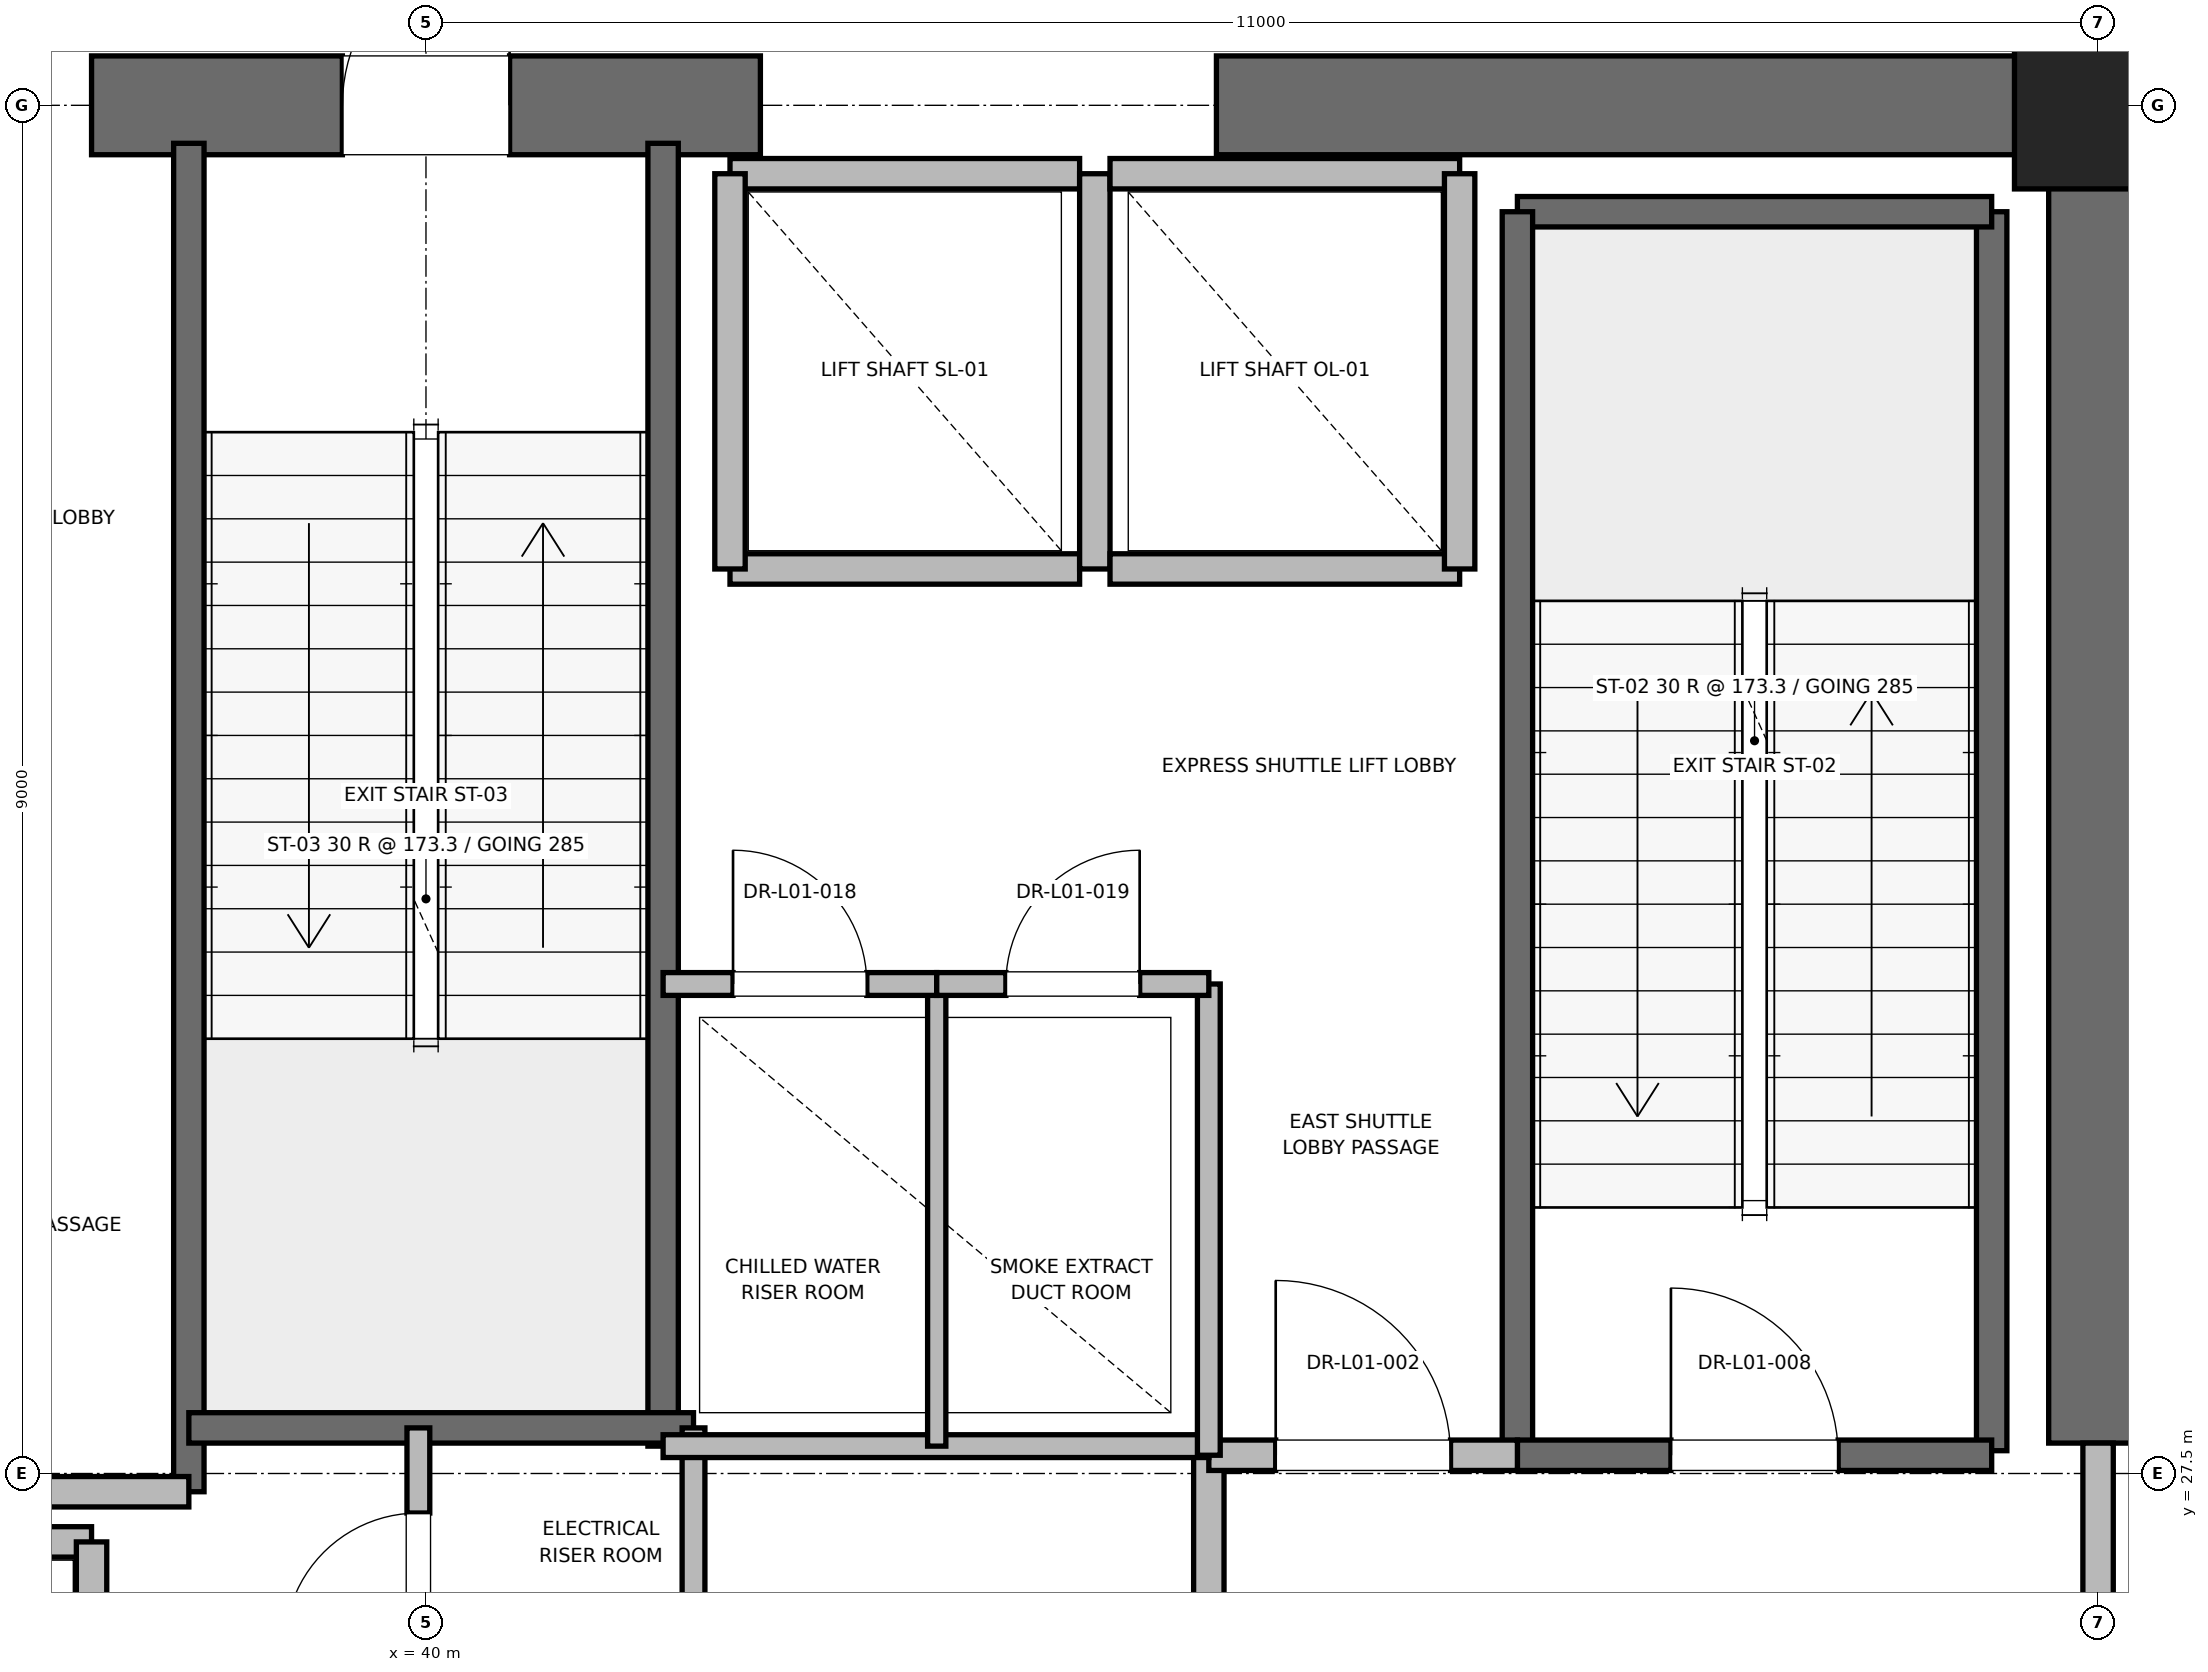
"""IFC4 building model, lengths in metres.
Left out: names, types, materials, properties, quantities, classifications, styles, units other than length and angle.
Written with IfcOpenShell. Run it as: python <this file> out.ifc"""

import sys

from ifc_helpers import new_model, si_unit, direction, frame, frame_2d, origin, origin_2d, place, context, subcontext, project, spatial, rectangle, extrude, element, fill, save


model = new_model("IFC4")
c1 = context("Model", 3, precision=1e-05, world=origin(), true_north=direction((0.0, 1.0)))
c2 = subcontext(c1, "Body", "Model", "MODEL_VIEW")
j1 = project(units=[si_unit("LENGTHUNIT", "METRE"), si_unit("PLANEANGLEUNIT", "RADIAN")], contexts=[c1])
p1 = place(None, origin())
s1 = spatial("IfcSite", under=j1, at=p1, CompositionType="ELEMENT")
p2 = place(p1, origin())
s2 = spatial("IfcBuilding", under=s1, at=p2, CompositionType="ELEMENT")
p3 = place(p2, frame((0.0, 0.0, 6.0)))
s3 = spatial("IfcBuildingStorey", under=s2, at=p3, CompositionType="ELEMENT", Elevation=6.0)
p4 = place(p3, frame((51.0, 36.5, 0.0), z_axis=(0.0, 0.0, 1.0), x_axis=(1.0, 0.0, 0.0)))
e1 = element("IfcColumn", 1, at=p4, inside=s3, PredefinedType="PILASTER", context=c2, shape_type="SweptSolid", body=[
    extrude(rectangle(XDim=1.1, YDim=1.1, at=origin_2d()), origin(), (0.0, 0.0, 1.0), 5.2),
])
p5 = place(p3, frame((37.8, 36.5, 0.0), z_axis=(0.0, 0.0, 1.0), x_axis=(1.0, 0.0, 0.0)))
e2 = element("IfcWall", 2, at=p5, inside=s3, PredefinedType="SHEAR", context=c2, shape_type="SweptSolid", body=[
    extrude(rectangle(XDim=4.4, YDim=0.65, at=frame_2d((2.2, 0.0))), origin(), (0.0, 0.0, 1.0), 4.92),
])
p6 = place(p5, frame((1.65, 0.0, 0.0)))
e3 = element("IfcOpeningElement", 3, at=p6, cuts=e2, PredefinedType="OPENING", context=c2, shape_type="SweptSolid", body=[
    extrude(rectangle(XDim=1.1, YDim=2.15, at=frame_2d((0.55, 1.075))), frame((0.0, 0.325, 0.0), z_axis=(0.0, -1.0, 0.0), x_axis=(1.0, 0.0, 0.0)), (0.0, 0.0, 1.0), 0.65),
])
p7 = place(p3, frame((45.2, 36.5, 0.0), z_axis=(0.0, 0.0, 1.0), x_axis=(1.0, 0.0, 0.0)))
e4 = element("IfcWall", 4, at=p7, inside=s3, PredefinedType="SHEAR", context=c2, shape_type="SweptSolid", body=[
    extrude(rectangle(XDim=5.8, YDim=0.65, at=frame_2d((2.9, 0.0))), origin(), (0.0, 0.0, 1.0), 4.92),
])
p8 = place(p3, frame((51.0, 27.7, 0.0), z_axis=(0.0, 0.0, 1.0), x_axis=(0.0, 1.0, 0.0)))
e5 = element("IfcWall", 5, at=p8, inside=s3, PredefinedType="SHEAR", context=c2, shape_type="SweptSolid", body=[
    extrude(rectangle(XDim=8.8, YDim=0.65, at=frame_2d((4.4, 0.0))), origin(), (0.0, 0.0, 1.0), 4.92),
])
p9 = place(p3, frame((50.3, 27.65, 0.0), z_axis=(0.0, 0.0, 1.0), x_axis=(0.0, 1.0, 0.0)))
e6 = element("IfcWall", 6, at=p9, inside=s3, PredefinedType="SOLIDWALL", context=c2, shape_type="SweptSolid", body=[
    extrude(rectangle(XDim=8.15, YDim=0.2, at=frame_2d((4.075, 0.0))), origin(), (0.0, 0.0, 1.0), 4.92),
])
p10 = place(p3, frame((47.18, 35.8, 0.0), z_axis=(0.0, 0.0, 1.0), x_axis=(1.0, 0.0, 0.0)))
e7 = element("IfcWall", 7, at=p10, inside=s3, PredefinedType="SOLIDWALL", context=c2, shape_type="SweptSolid", body=[
    extrude(rectangle(XDim=3.12, YDim=0.2, at=frame_2d((1.56, 0.0))), origin(), (0.0, 0.0, 1.0), 4.92),
])
p11 = place(p3, frame((47.18, 27.62, 0.0), z_axis=(0.0, 0.0, 1.0), x_axis=(0.0, 1.0, 0.0)))
e8 = element("IfcWall", 8, at=p11, inside=s3, PredefinedType="SOLIDWALL", context=c2, shape_type="SweptSolid", body=[
    extrude(rectangle(XDim=8.18, YDim=0.2, at=frame_2d((4.09, 0.0))), origin(), (0.0, 0.0, 1.0), 4.92),
])
p12 = place(p3, frame((47.18, 27.62, 0.0), z_axis=(0.0, 0.0, 1.0), x_axis=(1.0, 0.0, 0.0)))
e9 = element("IfcWall", 9, at=p12, inside=s3, PredefinedType="SOLIDWALL", context=c2, shape_type="SweptSolid", body=[
    extrude(rectangle(XDim=3.12, YDim=0.2, at=frame_2d((1.56, 0.0))), origin(), (0.0, 0.0, 1.0), 4.92),
])
p13 = place(p12, frame((1.01, 0.0, 0.0)))
e10 = element("IfcOpeningElement", 10, at=p13, cuts=e9, PredefinedType="OPENING", context=c2, shape_type="SweptSolid", body=[
    extrude(rectangle(XDim=1.1, YDim=2.15, at=frame_2d((0.55, 1.075))), frame((0.0, 0.1, 0.0), z_axis=(0.0, -1.0, 0.0), x_axis=(1.0, 0.0, 0.0)), (0.0, 0.0, 1.0), 0.2),
])
p14 = place(p3, frame((38.44, 27.38, 0.0), z_axis=(0.0, 0.0, 1.0), x_axis=(0.0, 1.0, 0.0)))
e11 = element("IfcWall", 11, at=p14, inside=s3, PredefinedType="SOLIDWALL", context=c2, shape_type="SweptSolid", body=[
    extrude(rectangle(XDim=8.87, YDim=0.2, at=frame_2d((4.435, 0.0))), origin(), (0.0, 0.0, 1.0), 4.92),
])
p15 = place(p3, frame((41.56, 27.68, 0.0), z_axis=(0.0, 0.0, 1.0), x_axis=(0.0, 1.0, 0.0)))
e12 = element("IfcWall", 12, at=p15, inside=s3, PredefinedType="SOLIDWALL", context=c2, shape_type="SweptSolid", body=[
    extrude(rectangle(XDim=8.57, YDim=0.2, at=frame_2d((4.285, 0.0))), origin(), (0.0, 0.0, 1.0), 4.92),
])
p16 = place(p3, frame((38.44, 27.8, 0.0), z_axis=(0.0, 0.0, 1.0), x_axis=(1.0, 0.0, 0.0)))
e13 = element("IfcWall", 13, at=p16, inside=s3, PredefinedType="SOLIDWALL", context=c2, shape_type="SweptSolid", body=[
    extrude(rectangle(XDim=3.32, YDim=0.2, at=frame_2d((1.66, 0.0))), origin(), (0.0, 0.0, 1.0), 4.92),
])
p17 = place(p3, frame((32.82, 27.38, 0.0), z_axis=(0.0, 0.0, 1.0), x_axis=(1.0, 0.0, 0.0)))
e14 = element("IfcWall", 14, at=p17, inside=s3, PredefinedType="PARTITIONING", context=c2, shape_type="SweptSolid", body=[
    extrude(rectangle(XDim=5.62, YDim=0.2, at=frame_2d((2.81, 0.0))), origin(), (0.0, 0.0, 1.0), 4.92),
])
p18 = place(p3, frame((45.15, 24.25, 0.0), z_axis=(0.0, 0.0, 1.0), x_axis=(0.0, 1.0, 0.0)))
e15 = element("IfcWall", 15, at=p18, inside=s3, PredefinedType="PARTITIONING", context=c2, shape_type="SweptSolid", body=[
    extrude(rectangle(XDim=3.37, YDim=0.2, at=frame_2d((1.685, 0.0))), origin(), (0.0, 0.0, 1.0), 4.92),
])
p19 = place(p3, frame((45.15, 27.62, 0.0), z_axis=(0.0, 0.0, 1.0), x_axis=(1.0, 0.0, 0.0)))
e16 = element("IfcWall", 16, at=p19, inside=s3, PredefinedType="PARTITIONING", context=c2, shape_type="SweptSolid", body=[
    extrude(rectangle(XDim=2.03, YDim=0.2, at=frame_2d((1.015, 0.0))), origin(), (0.0, 0.0, 1.0), 4.92),
])
p20 = place(p19, frame((0.44, 0.0, 0.0)))
e17 = element("IfcOpeningElement", 17, at=p20, cuts=e16, PredefinedType="OPENING", context=c2, shape_type="SweptSolid", body=[
    extrude(rectangle(XDim=1.15, YDim=2.2, at=frame_2d((0.575, 1.1))), frame((0.0, 0.1, 0.0), z_axis=(0.0, -1.0, 0.0), x_axis=(1.0, 0.0, 0.0)), (0.0, 0.0, 1.0), 0.2),
])
p21 = place(p3, frame((51.0, 24.3, 0.0), z_axis=(0.0, 0.0, 1.0), x_axis=(0.0, 1.0, 0.0)))
e18 = element("IfcWall", 18, at=p21, inside=s3, PredefinedType="PARTITIONING", context=c2, shape_type="SweptSolid", body=[
    extrude(rectangle(XDim=3.4, YDim=0.2, at=frame_2d((1.7, 0.0))), origin(), (0.0, 0.0, 1.0), 3.7),
])
p22 = place(p21, frame((1.125, 0.0, 0.0)))
e19 = element("IfcOpeningElement", 19, at=p22, cuts=e18, PredefinedType="OPENING", context=c2, shape_type="SweptSolid", body=[
    extrude(rectangle(XDim=1.15, YDim=2.2, at=frame_2d((0.575, 1.1))), frame((0.0, 0.1, 0.0), z_axis=(0.0, -1.0, 0.0), x_axis=(1.0, 0.0, 0.0)), (0.0, 0.0, 1.0), 0.2),
])
p23 = place(p3, frame((37.8, 27.05, 0.0), z_axis=(0.0, 0.0, 1.0), x_axis=(-1.0, 0.0, 0.0)))
e20 = element("IfcWall", 20, at=p23, inside=s3, PredefinedType="SOLIDWALL", context=c2, shape_type="SweptSolid", body=[
    extrude(rectangle(XDim=2.3, YDim=0.2, at=frame_2d((1.15, 0.0))), origin(), (0.0, 0.0, 1.0), 4.92),
])
p24 = place(p3, frame((37.8, 24.45, 0.0), z_axis=(0.0, 0.0, 1.0), x_axis=(0.0, 1.0, 0.0)))
e21 = element("IfcWall", 21, at=p24, inside=s3, PredefinedType="SOLIDWALL", context=c2, shape_type="SweptSolid", body=[
    extrude(rectangle(XDim=2.6, YDim=0.2, at=frame_2d((1.3, 0.0))), origin(), (0.0, 0.0, 1.0), 4.92),
])
p25 = place(p3, frame((42.0, 33.45, 0.0), z_axis=(0.0, 0.0, 1.0), x_axis=(1.0, 0.0, 0.0)))
e22 = element("IfcWall", 22, at=p25, inside=s3, PredefinedType="SOLIDWALL", context=c2, shape_type="SweptSolid", body=[
    extrude(rectangle(XDim=2.3, YDim=0.2, at=frame_2d((1.15, 0.0))), origin(), (0.0, 0.0, 1.0), 4.92),
])
p26 = place(p3, frame((44.3, 36.05, 0.0), z_axis=(0.0, 0.0, 1.0), x_axis=(-1.0, 0.0, 0.0)))
e23 = element("IfcWall", 23, at=p26, inside=s3, PredefinedType="SOLIDWALL", context=c2, shape_type="SweptSolid", body=[
    extrude(rectangle(XDim=2.3, YDim=0.2, at=frame_2d((1.15, 0.0))), origin(), (0.0, 0.0, 1.0), 3.7),
])
for number, where, z_axis, x_axis in (
    (24, (42.0, 36.05, 0.0), (0.0, 0.0, 1.0), (0.0, -1.0, 0.0)),
    (25, (44.4, 33.45, 0.0), (0.0, 0.0, 1.0), (0.0, 1.0, 0.0)),
):
    element("IfcWall", number, at=place(p3, frame(where, z_axis=z_axis, x_axis=x_axis)), inside=s3, PredefinedType="SOLIDWALL", context=c2, shape_type="SweptSolid", body=[
        extrude(rectangle(XDim=2.6, YDim=0.2, at=frame_2d((1.3, 0.0))), origin(), (0.0, 0.0, 1.0), 3.7),
    ])
p27 = place(p3, frame((44.5, 33.45, 0.0), z_axis=(0.0, 0.0, 1.0), x_axis=(1.0, 0.0, 0.0)))
e26 = element("IfcWall", 26, at=p27, inside=s3, PredefinedType="SOLIDWALL", context=c2, shape_type="SweptSolid", body=[
    extrude(rectangle(XDim=2.3, YDim=0.2, at=frame_2d((1.15, 0.0))), origin(), (0.0, 0.0, 1.0), 4.92),
])
p28 = place(p3, frame((46.8, 36.05, 0.0), z_axis=(0.0, 0.0, 1.0), x_axis=(-1.0, 0.0, 0.0)))
e27 = element("IfcWall", 27, at=p28, inside=s3, PredefinedType="SOLIDWALL", context=c2, shape_type="SweptSolid", body=[
    extrude(rectangle(XDim=2.3, YDim=0.2, at=frame_2d((1.15, 0.0))), origin(), (0.0, 0.0, 1.0), 3.7),
])
p29 = place(p3, frame((46.8, 33.45, 0.0), z_axis=(0.0, 0.0, 1.0), x_axis=(0.0, 1.0, 0.0)))
e28 = element("IfcWall", 28, at=p29, inside=s3, PredefinedType="SOLIDWALL", context=c2, shape_type="SweptSolid", body=[
    extrude(rectangle(XDim=2.6, YDim=0.2, at=frame_2d((1.3, 0.0))), origin(), (0.0, 0.0, 1.0), 4.92),
])
p30 = place(p3, frame((41.76, 23.8, 0.0), z_axis=(0.0, 0.0, 1.0), x_axis=(0.0, 1.0, 0.0)))
e29 = element("IfcWall", 29, at=p30, inside=s3, PredefinedType="PARTITIONING", context=c2, shape_type="SweptSolid", body=[
    extrude(rectangle(XDim=4.0, YDim=0.15, at=frame_2d((2.0, 0.0))), origin(), (0.0, 0.0, 1.0), 2.85),
])
p31 = place(p3, frame((39.95, 25.8, 0.0), z_axis=(0.0, 0.0, 1.0), x_axis=(0.0, 1.0, 0.0)))
e30 = element("IfcWall", 30, at=p31, inside=s3, PredefinedType="PARTITIONING", context=c2, shape_type="SweptSolid", body=[
    extrude(rectangle(XDim=2.0, YDim=0.15, at=frame_2d((1.0, 0.0))), origin(), (0.0, 0.0, 1.0), 2.85),
])
p32 = place(p31, frame((0.56, 0.0, 0.0)))
e31 = element("IfcOpeningElement", 31, at=p32, cuts=e30, PredefinedType="OPENING", context=c2, shape_type="SweptSolid", body=[
    extrude(rectangle(XDim=0.88, YDim=2.1, at=frame_2d((0.44, 1.05))), frame((0.0, 0.075, 0.0), z_axis=(0.0, -1.0, 0.0), x_axis=(1.0, 0.0, 0.0)), (0.0, 0.0, 1.0), 0.15),
])
p33 = place(p3, frame((41.56, 27.68, 0.0), z_axis=(0.0, 0.0, 1.0), x_axis=(1.0, 0.0, 0.0)))
e32 = element("IfcWall", 32, at=p33, inside=s3, PredefinedType="PARTITIONING", context=c2, shape_type="SweptSolid", body=[
    extrude(rectangle(XDim=3.59, YDim=0.15, at=frame_2d((1.795, 0.0))), origin(), (0.0, 0.0, 1.0), 2.85),
])
p34 = place(p3, frame((45.15, 27.62, 0.0), z_axis=(0.0, 0.0, 1.0), x_axis=(0.0, 1.0, 0.0)))
e33 = element("IfcWall", 33, at=p34, inside=s3, PredefinedType="PARTITIONING", context=c2, shape_type="SweptSolid", body=[
    extrude(rectangle(XDim=3.1, YDim=0.15, at=frame_2d((1.55, 0.0))), origin(), (0.0, 0.0, 1.0), 2.85),
])
p35 = place(p3, frame((43.36, 27.68, 0.0), z_axis=(0.0, 0.0, 1.0), x_axis=(0.0, 1.0, 0.0)))
e34 = element("IfcWall", 34, at=p35, inside=s3, PredefinedType="PARTITIONING", context=c2, shape_type="SweptSolid", body=[
    extrude(rectangle(XDim=3.04, YDim=0.12, at=frame_2d((1.52, 0.0))), origin(), (0.0, 0.0, 1.0), 2.85),
])
p36 = place(p3, frame((41.56, 30.72, 0.0), z_axis=(0.0, 0.0, 1.0), x_axis=(1.0, 0.0, 0.0)))
e35 = element("IfcWall", 35, at=p36, inside=s3, PredefinedType="PARTITIONING", context=c2, shape_type="SweptSolid", body=[
    extrude(rectangle(XDim=1.8, YDim=0.15, at=frame_2d((0.9, 0.0))), origin(), (0.0, 0.0, 1.0), 2.85),
])
p37 = place(p36, frame((0.46, 0.0, 0.0)))
e36 = element("IfcOpeningElement", 36, at=p37, cuts=e35, PredefinedType="OPENING", context=c2, shape_type="SweptSolid", body=[
    extrude(rectangle(XDim=0.88, YDim=2.1, at=frame_2d((0.44, 1.05))), frame((0.0, 0.075, 0.0), z_axis=(0.0, -1.0, 0.0), x_axis=(1.0, 0.0, 0.0)), (0.0, 0.0, 1.0), 0.15),
])
p38 = place(p3, frame((43.36, 30.72, 0.0), z_axis=(0.0, 0.0, 1.0), x_axis=(1.0, 0.0, 0.0)))
e37 = element("IfcWall", 37, at=p38, inside=s3, PredefinedType="PARTITIONING", context=c2, shape_type="SweptSolid", body=[
    extrude(rectangle(XDim=1.79, YDim=0.15, at=frame_2d((0.895, 0.0))), origin(), (0.0, 0.0, 1.0), 2.85),
])
p39 = place(p38, frame((0.455, 0.0, 0.0)))
e38 = element("IfcOpeningElement", 38, at=p39, cuts=e37, PredefinedType="OPENING", context=c2, shape_type="SweptSolid", body=[
    extrude(rectangle(XDim=0.88, YDim=2.1, at=frame_2d((0.44, 1.05))), frame((0.0, 0.075, 0.0), z_axis=(0.0, -1.0, 0.0), x_axis=(1.0, 0.0, 0.0)), (0.0, 0.0, 1.0), 0.15),
])
p40 = place(p13, origin())
e39 = element("IfcDoor", 39, at=p40, inside=s3, OperationType="SINGLE_SWING_LEFT", PredefinedType="DOOR", context=c2, shape_type="SweptSolid", body=[
    extrude(rectangle(XDim=1.1, YDim=2.15, at=frame_2d((0.55, 1.075))), frame((0.0, 0.025, 0.0), z_axis=(0.0, -1.0, 0.0), x_axis=(1.0, 0.0, 0.0)), (0.0, 0.0, 1.0), 0.05),
])
fill(e10, e39)
p41 = place(p6, origin())
e40 = element("IfcDoor", 40, at=p41, inside=s3, OperationType="SINGLE_SWING_RIGHT", PredefinedType="DOOR", context=c2, shape_type="SweptSolid", body=[
    extrude(rectangle(XDim=1.1, YDim=2.15, at=frame_2d((0.55, 1.075))), frame((0.0, 0.025, 0.0), z_axis=(0.0, -1.0, 0.0), x_axis=(1.0, 0.0, 0.0)), (0.0, 0.0, 1.0), 0.05),
])
fill(e3, e40)
p42 = place(p20, origin())
e41 = element("IfcDoor", 41, at=p42, inside=s3, OperationType="SINGLE_SWING_LEFT", PredefinedType="DOOR", context=c2, shape_type="SweptSolid", body=[
    extrude(rectangle(XDim=1.15, YDim=2.2, at=frame_2d((0.575, 1.1))), frame((0.0, 0.025, 0.0), z_axis=(0.0, -1.0, 0.0), x_axis=(1.0, 0.0, 0.0)), (0.0, 0.0, 1.0), 0.05),
])
fill(e17, e41)
p43 = place(p32, origin())
e42 = element("IfcDoor", 42, at=p43, inside=s3, OperationType="SINGLE_SWING_LEFT", PredefinedType="DOOR", context=c2, shape_type="SweptSolid", body=[
    extrude(rectangle(XDim=0.88, YDim=2.1, at=frame_2d((0.44, 1.05))), frame((0.0, 0.025, 0.0), z_axis=(0.0, -1.0, 0.0), x_axis=(1.0, 0.0, 0.0)), (0.0, 0.0, 1.0), 0.05),
])
fill(e31, e42)
p44 = place(p37, origin())
e43 = element("IfcDoor", 43, at=p44, inside=s3, OperationType="SINGLE_SWING_LEFT", PredefinedType="DOOR", context=c2, shape_type="SweptSolid", body=[
    extrude(rectangle(XDim=0.88, YDim=2.1, at=frame_2d((0.44, 1.05))), frame((0.0, 0.025, 0.0), z_axis=(0.0, -1.0, 0.0), x_axis=(1.0, 0.0, 0.0)), (0.0, 0.0, 1.0), 0.05),
])
fill(e36, e43)
p45 = place(p39, origin())
e44 = element("IfcDoor", 44, at=p45, inside=s3, OperationType="SINGLE_SWING_RIGHT", PredefinedType="DOOR", context=c2, shape_type="SweptSolid", body=[
    extrude(rectangle(XDim=0.88, YDim=2.1, at=frame_2d((0.44, 1.05))), frame((0.0, 0.025, 0.0), z_axis=(0.0, -1.0, 0.0), x_axis=(1.0, 0.0, 0.0)), (0.0, 0.0, 1.0), 0.05),
])
fill(e38, e44)
save(model, sys.argv[1])
